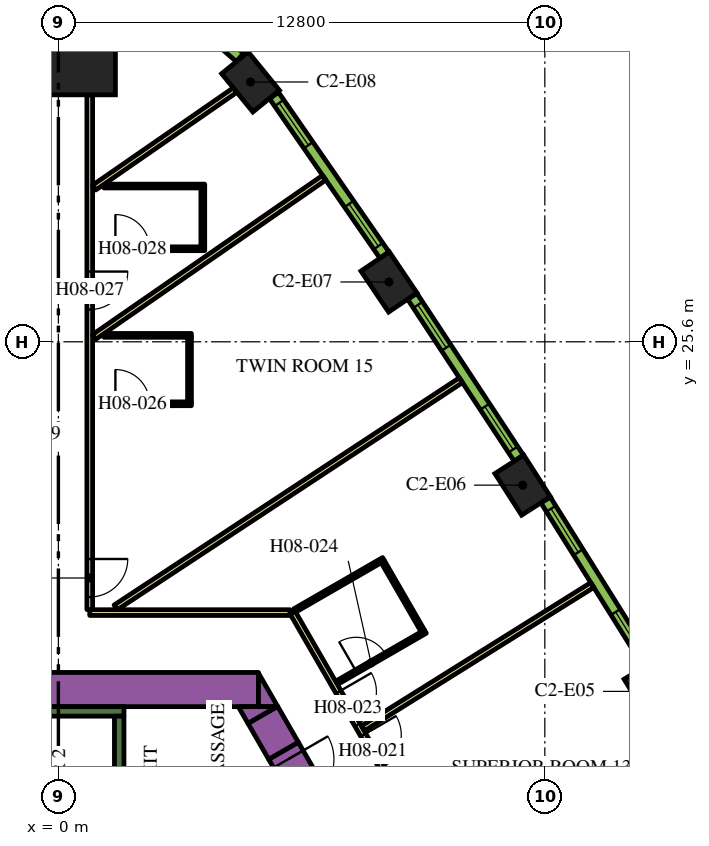
"""IFC4 building model, lengths in metres.
Left out: names, types, materials, properties, quantities, classifications, styles, units other than length and angle.
Written with IfcOpenShell. Run it as: python <this file> out.ifc"""

import sys

from ifc_helpers import new_model, si_unit, direction, frame, frame_2d, origin, origin_2d, place, context, subcontext, project, spatial, polyline, rectangle, outline, extrude, element, fill, save


model = new_model("IFC4")
c1 = context("Model", 3, precision=1e-05, world=origin(), true_north=direction((0.0, 1.0)))
c2 = subcontext(c1, "Body", "Model", "MODEL_VIEW")
j1 = project(units=[si_unit("LENGTHUNIT", "METRE"), si_unit("PLANEANGLEUNIT", "RADIAN")], contexts=[c1])
p1 = place(None, origin())
s1 = spatial("IfcSite", under=j1, at=p1, CompositionType="ELEMENT")
p2 = place(p1, origin())
s2 = spatial("IfcBuilding", under=s1, at=p2, CompositionType="ELEMENT")
p3 = place(p2, frame((0.0, 0.0, 114.9)))
s3 = spatial("IfcBuildingStorey", under=s2, at=p3, CompositionType="ELEMENT", Elevation=114.9)
p4 = place(p3, frame((0.0, 33.598, 0.0), z_axis=(0.0, 0.0, 1.0), x_axis=(0.0, 1.0, 0.0)))
e1 = element("IfcColumn", 1, at=p4, inside=s3, PredefinedType="COLUMN", context=c2, shape_type="SweptSolid", body=[
    extrude(rectangle(XDim=3.0, YDim=3.0, at=origin_2d()), origin(), (0.0, 0.0, 1.0), 3.9),
])
for number, where, z_axis, x_axis in (
    (2, (15.609, 16.402, 0.0), (0.0, 0.0, 1.0), (-0.52, 0.854, 0.0)),
    (3, (12.217, 21.828, 0.0), (0.0, 0.0, 1.0), (-0.54, 0.842, 0.0)),
    (4, (8.699, 27.174, 0.0), (0.0, 0.0, 1.0), (-0.559, 0.829, 0.0)),
    (5, (5.056, 32.437, 0.0), (0.0, 0.0, 1.0), (-0.632, 0.775, 0.0)),
):
    element("IfcColumn", number, at=place(p3, frame(where, z_axis=z_axis, x_axis=x_axis)), inside=s3, PredefinedType="COLUMN", context=c2, shape_type="SweptSolid", body=[
        extrude(rectangle(XDim=1.3, YDim=0.9, at=origin_2d()), origin(), (0.0, 0.0, 1.0), 3.9),
    ])
p5 = place(p3, frame((-4.224, 16.45, 0.0), z_axis=(0.0, 0.0, 1.0), x_axis=(1.0, 0.0, 0.0)))
e6 = element("IfcWall", 6, at=p5, inside=s3, PredefinedType="SOLIDWALL", context=c2, shape_type="SweptSolid", body=[
    extrude(rectangle(XDim=9.488, YDim=0.9, at=frame_2d((4.744, 0.0))), origin(), (0.0, 0.0, 1.0), 3.9),
])
p6 = place(p3, origin())
e7 = element("IfcWall", 7, at=p6, inside=s3, PredefinedType="SOLIDWALL", context=c2, shape_type="SweptSolid", body=[
    extrude(outline(polyline([(5.265, 16.0), (5.265, 16.88), (5.773, 16.0), (5.265, 16.0)])), origin(), (0.0, 0.0, 1.0), 3.9),
])
p7 = place(p3, frame((5.926, 14.836, 0.0), z_axis=(0.0, 0.0, 1.0), x_axis=(-0.500076735116, 0.865981096212, 0.0)))
e8 = element("IfcWall", 8, at=p7, inside=s3, PredefinedType="SOLIDWALL", context=c2, shape_type="SweptSolid", body=[
    extrude(rectangle(XDim=1.094, YDim=0.9, at=frame_2d((0.547, 0.0))), origin(), (0.0, 0.0, 1.0), 3.9),
])
e9 = element("IfcWall", 9, at=p6, inside=s3, PredefinedType="SOLIDWALL", context=c2, shape_type="SweptSolid", body=[
    extrude(outline(polyline([(4.734, 16.0), (5.75, 16.0), (4.988, 15.56), (4.734, 16.0)])), origin(), (0.0, 0.0, 1.0), 3.9),
])
p8 = place(p3, frame((-1.725, 15.875, 0.0), z_axis=(0.0, 0.0, 1.0), x_axis=(1.0, 0.0, 0.0)))
e10 = element("IfcWall", 10, at=p8, inside=s3, PredefinedType="SOLIDWALL", context=c2, shape_type="SweptSolid", body=[
    extrude(rectangle(XDim=3.45, YDim=0.25, at=frame_2d((1.725, 0.0))), origin(), (0.0, 0.0, 1.0), 3.9),
])
p9 = place(p3, frame((1.6, 8.95, 0.0), z_axis=(0.0, 0.0, 1.0), x_axis=(0.0, 1.0, 0.0)))
e11 = element("IfcWall", 11, at=p9, inside=s3, PredefinedType="SOLIDWALL", context=c2, shape_type="SweptSolid", body=[
    extrude(rectangle(XDim=6.8, YDim=0.25, at=frame_2d((3.4, 0.0))), origin(), (0.0, 0.0, 1.0), 3.9),
])
p10 = place(p3, frame((5.926, 14.836, 0.0), z_axis=(0.0, 0.0, 1.0), x_axis=(0.500062241894, -0.865989465428, 0.0)))
e12 = element("IfcWall", 12, at=p10, inside=s3, PredefinedType="SOLIDWALL", context=c2, shape_type="SweptSolid", body=[
    extrude(rectangle(XDim=1.7, YDim=0.9, at=frame_2d((0.85, 0.0))), origin(), (0.0, 0.0, 1.0), 3.9),
])
p11 = place(p10, frame((0.25, 0.0, 0.0)))
e13 = element("IfcOpeningElement", 13, at=p11, cuts=e12, PredefinedType="OPENING", context=c2, shape_type="SweptSolid", body=[
    extrude(rectangle(XDim=1.2, YDim=2.1, at=frame_2d((0.6, 1.05))), frame((0.0, 0.46, 0.0), z_axis=(0.0, -1.0, 0.0), x_axis=(1.0, 0.0, 0.0)), (0.0, 0.0, 1.0), 0.92),
])
p12 = place(p3, frame((6.163, 18.475, 0.0), z_axis=(0.0, 0.0, 1.0), x_axis=(0.500001317485, -0.866024643133, 0.0)))
e14 = element("IfcWall", 14, at=p12, inside=s3, PredefinedType="PARTITIONING", context=c2, shape_type="SweptSolid", body=[
    extrude(rectangle(XDim=25.767, YDim=0.15, at=frame_2d((12.883, 0.0))), origin(), (0.0, 0.0, 1.0), 2.75),
])
p13 = place(p12, frame((24.241, 0.0, 0.0)))
e15 = element("IfcOpeningElement", 15, at=p13, cuts=e14, PredefinedType="OPENING", context=c2, shape_type="SweptSolid", body=[
    extrude(rectangle(XDim=1.0, YDim=2.1, at=frame_2d((0.5, 1.05))), frame((0.0, 0.085, 0.0), z_axis=(0.0, -1.0, 0.0), x_axis=(1.0, 0.0, 0.0)), (0.0, 0.0, 1.0), 0.17),
])
p14 = place(p12, frame((13.144, 0.0, 0.0)))
e16 = element("IfcOpeningElement", 16, at=p14, cuts=e14, PredefinedType="OPENING", context=c2, shape_type="SweptSolid", body=[
    extrude(rectangle(XDim=1.0, YDim=2.1, at=frame_2d((0.5, 1.05))), frame((0.0, 0.085, 0.0), z_axis=(0.0, -1.0, 0.0), x_axis=(1.0, 0.0, 0.0)), (0.0, 0.0, 1.0), 0.17),
])
p15 = place(p12, frame((10.874, 0.0, 0.0)))
e17 = element("IfcOpeningElement", 17, at=p15, cuts=e14, PredefinedType="OPENING", context=c2, shape_type="SweptSolid", body=[
    extrude(rectangle(XDim=0.9, YDim=2.1, at=frame_2d((0.45, 1.05))), frame((0.0, 0.085, 0.0), z_axis=(0.0, -1.0, 0.0), x_axis=(1.0, 0.0, 0.0)), (0.0, 0.0, 1.0), 0.17),
])
p16 = place(p12, frame((3.718, 0.0, 0.0)))
e18 = element("IfcOpeningElement", 18, at=p16, cuts=e14, PredefinedType="OPENING", context=c2, shape_type="SweptSolid", body=[
    extrude(rectangle(XDim=1.0, YDim=2.1, at=frame_2d((0.5, 1.05))), frame((0.0, 0.085, 0.0), z_axis=(0.0, -1.0, 0.0), x_axis=(1.0, 0.0, 0.0)), (0.0, 0.0, 1.0), 0.17),
])
p17 = place(p12, frame((2.411, 0.0, 0.0)))
e19 = element("IfcOpeningElement", 19, at=p17, cuts=e14, PredefinedType="OPENING", context=c2, shape_type="SweptSolid", body=[
    extrude(rectangle(XDim=1.0, YDim=2.1, at=frame_2d((0.5, 1.05))), frame((0.0, 0.085, 0.0), z_axis=(0.0, -1.0, 0.0), x_axis=(1.0, 0.0, 0.0)), (0.0, 0.0, 1.0), 0.17),
])
p18 = place(p3, frame((0.825, 18.475, 0.0), z_axis=(0.0, 0.0, 1.0), x_axis=(1.0, 0.0, 0.0)))
e20 = element("IfcWall", 20, at=p18, inside=s3, PredefinedType="PARTITIONING", context=c2, shape_type="SweptSolid", body=[
    extrude(rectangle(XDim=5.268, YDim=0.15, at=frame_2d((2.634, 0.0))), origin(), (0.0, 0.0, 1.0), 2.75),
])
p19 = place(p3, frame((0.825, 32.098, 0.0), z_axis=(0.0, 0.0, 1.0), x_axis=(0.0, -1.0, 0.0)))
e21 = element("IfcWall", 21, at=p19, inside=s3, PredefinedType="PARTITIONING", context=c2, shape_type="SweptSolid", body=[
    extrude(rectangle(XDim=13.543, YDim=0.15, at=frame_2d((6.772, 0.0))), origin(), (0.0, 0.0, 1.0), 2.75),
])
p20 = place(p19, frame((12.213, 0.0, 0.0)))
e22 = element("IfcOpeningElement", 22, at=p20, cuts=e21, PredefinedType="OPENING", context=c2, shape_type="SweptSolid", body=[
    extrude(rectangle(XDim=1.0, YDim=2.1, at=frame_2d((0.5, 1.05))), frame((0.0, 0.085, 0.0), z_axis=(0.0, -1.0, 0.0), x_axis=(1.0, 0.0, 0.0)), (0.0, 0.0, 1.0), 0.17),
])
p21 = place(p19, frame((4.65, 0.0, 0.0)))
e23 = element("IfcOpeningElement", 23, at=p21, cuts=e21, PredefinedType="OPENING", context=c2, shape_type="SweptSolid", body=[
    extrude(rectangle(XDim=1.0, YDim=2.1, at=frame_2d((0.5, 1.05))), frame((0.0, 0.085, 0.0), z_axis=(0.0, -1.0, 0.0), x_axis=(1.0, 0.0, 0.0)), (0.0, 0.0, 1.0), 0.17),
])
p22 = place(p3, frame((6.994, 29.917, 0.0), z_axis=(0.0, 0.0, 1.0), x_axis=(-0.822255462494, -0.569118576747, 0.0)))
e24 = element("IfcWall", 24, at=p22, inside=s3, PredefinedType="PARTITIONING", context=c2, shape_type="SweptSolid", body=[
    extrude(rectangle(XDim=7.362, YDim=0.15, at=frame_2d((3.681, 0.0))), origin(), (0.0, 0.0, 1.0), 2.75),
])
p23 = place(p3, frame((10.592, 24.589, 0.0), z_axis=(0.0, 0.0, 1.0), x_axis=(-0.835337323748, -0.549737715236, 0.0)))
e25 = element("IfcWall", 25, at=p23, inside=s3, PredefinedType="PARTITIONING", context=c2, shape_type="SweptSolid", body=[
    extrude(rectangle(XDim=10.875, YDim=0.15, at=frame_2d((5.438, 0.0))), origin(), (0.0, 0.0, 1.0), 2.75),
])
p24 = place(p3, frame((4.649, 32.223, 0.0), z_axis=(0.0, 0.0, 1.0), x_axis=(-0.822262349475, -0.569108626394, 0.0)))
e26 = element("IfcWall", 26, at=p24, inside=s3, PredefinedType="PARTITIONING", context=c2, shape_type="SweptSolid", body=[
    extrude(rectangle(XDim=4.51, YDim=0.15, at=frame_2d((2.255, 0.0))), origin(), (0.0, 0.0, 1.0), 2.75),
])
p25 = place(p3, frame((14.049, 19.2, 0.0), z_axis=(0.0, 0.0, 1.0), x_axis=(-0.847955867271, -0.530066832731, 0.0)))
e27 = element("IfcWall", 27, at=p25, inside=s3, PredefinedType="PARTITIONING", context=c2, shape_type="SweptSolid", body=[
    extrude(rectangle(XDim=7.111, YDim=0.15, at=frame_2d((3.556, 0.0))), origin(), (0.0, 0.0, 1.0), 2.75),
])
p26 = place(p3, frame((7.318, 16.625, 0.0), z_axis=(0.0, 0.0, 1.0), x_axis=(0.866019956843, 0.50000943426, 0.0)))
e28 = element("IfcWall", 28, at=p26, inside=s3, PredefinedType="PARTITIONING", context=c2, shape_type="SweptSolid", body=[
    extrude(rectangle(XDim=2.7, YDim=0.1, at=frame_2d((1.35, 0.0))), origin(), (0.0, 0.0, 1.0), 2.75),
])
p27 = place(p26, frame((0.6, 0.0, 0.0)))
e29 = element("IfcOpeningElement", 29, at=p27, cuts=e28, PredefinedType="OPENING", context=c2, shape_type="SweptSolid", body=[
    extrude(rectangle(XDim=0.9, YDim=2.1, at=frame_2d((0.45, 1.05))), frame((0.0, 0.06, 0.0), z_axis=(0.0, -1.0, 0.0), x_axis=(1.0, 0.0, 0.0)), (0.0, 0.0, 1.0), 0.12),
])
p28 = place(p3, frame((9.588, 17.993, 0.0), z_axis=(0.0, 0.0, 1.0), x_axis=(-0.500027713859, 0.866009402589, 0.0)))
e30 = element("IfcWall", 30, at=p28, inside=s3, PredefinedType="PARTITIONING", context=c2, shape_type="SweptSolid", body=[
    extrude(rectangle(XDim=2.1, YDim=0.1, at=frame_2d((1.05, 0.0))), origin(), (0.0, 0.0, 1.0), 2.75),
])
p29 = place(p3, frame((6.218, 18.53, 0.0), z_axis=(0.0, 0.0, 1.0), x_axis=(0.86599734893, 0.500048589285, 0.0)))
e31 = element("IfcWall", 31, at=p29, inside=s3, PredefinedType="PARTITIONING", context=c2, shape_type="SweptSolid", body=[
    extrude(rectangle(XDim=2.7, YDim=0.1, at=frame_2d((1.35, 0.0))), origin(), (0.0, 0.0, 1.0), 2.75),
])
p30 = place(p3, frame((0.9, 23.969, 0.0), z_axis=(0.0, 0.0, 1.0), x_axis=(1.0, 0.0, 0.0)))
e32 = element("IfcWall", 32, at=p30, inside=s3, PredefinedType="PARTITIONING", context=c2, shape_type="SweptSolid", body=[
    extrude(rectangle(XDim=2.6, YDim=0.1, at=frame_2d((1.3, 0.0))), origin(), (0.0, 0.0, 1.0), 2.75),
])
p31 = place(p30, frame((0.6, 0.0, 0.0)))
e33 = element("IfcOpeningElement", 33, at=p31, cuts=e32, PredefinedType="OPENING", context=c2, shape_type="SweptSolid", body=[
    extrude(rectangle(XDim=0.9, YDim=2.1, at=frame_2d((0.45, 1.05))), frame((0.0, 0.06, 0.0), z_axis=(0.0, -1.0, 0.0), x_axis=(1.0, 0.0, 0.0)), (0.0, 0.0, 1.0), 0.12),
])
p32 = place(p3, frame((3.45, 24.019, 0.0), z_axis=(0.0, 0.0, 1.0), x_axis=(0.0, 1.0, 0.0)))
e34 = element("IfcWall", 34, at=p32, inside=s3, PredefinedType="PARTITIONING", context=c2, shape_type="SweptSolid", body=[
    extrude(rectangle(XDim=1.7, YDim=0.1, at=frame_2d((0.85, 0.0))), origin(), (0.0, 0.0, 1.0), 2.75),
])
p33 = place(p3, frame((1.2, 25.769, 0.0), z_axis=(0.0, 0.0, 1.0), x_axis=(1.0, 0.0, 0.0)))
e35 = element("IfcWall", 35, at=p33, inside=s3, PredefinedType="PARTITIONING", context=c2, shape_type="SweptSolid", body=[
    extrude(rectangle(XDim=2.3, YDim=0.1, at=frame_2d((1.15, 0.0))), origin(), (0.0, 0.0, 1.0), 2.75),
])
p34 = place(p3, frame((0.9, 28.048, 0.0), z_axis=(0.0, 0.0, 1.0), x_axis=(1.0, 0.0, 0.0)))
e36 = element("IfcWall", 36, at=p34, inside=s3, PredefinedType="PARTITIONING", context=c2, shape_type="SweptSolid", body=[
    extrude(rectangle(XDim=2.95, YDim=0.1, at=frame_2d((1.475, 0.0))), origin(), (0.0, 0.0, 1.0), 2.75),
])
p35 = place(p34, frame((0.6, 0.0, 0.0)))
e37 = element("IfcOpeningElement", 37, at=p35, cuts=e36, PredefinedType="OPENING", context=c2, shape_type="SweptSolid", body=[
    extrude(rectangle(XDim=0.9, YDim=2.1, at=frame_2d((0.45, 1.05))), frame((0.0, 0.06, 0.0), z_axis=(0.0, -1.0, 0.0), x_axis=(1.0, 0.0, 0.0)), (0.0, 0.0, 1.0), 0.12),
])
p36 = place(p3, frame((3.8, 28.098, 0.0), z_axis=(0.0, 0.0, 1.0), x_axis=(0.0, 1.0, 0.0)))
e38 = element("IfcWall", 38, at=p36, inside=s3, PredefinedType="PARTITIONING", context=c2, shape_type="SweptSolid", body=[
    extrude(rectangle(XDim=1.55, YDim=0.1, at=frame_2d((0.775, 0.0))), origin(), (0.0, 0.0, 1.0), 2.75),
])
p37 = place(p3, frame((1.2, 29.698, 0.0), z_axis=(0.0, 0.0, 1.0), x_axis=(1.0, 0.0, 0.0)))
e39 = element("IfcWall", 39, at=p37, inside=s3, PredefinedType="PARTITIONING", context=c2, shape_type="SweptSolid", body=[
    extrude(rectangle(XDim=2.65, YDim=0.1, at=frame_2d((1.325, 0.0))), origin(), (0.0, 0.0, 1.0), 2.75),
])
p38 = place(p3, frame((15.524, 17.114, 0.0), z_axis=(0.0, 0.0, 1.0), x_axis=(-0.530072082134, 0.847952585787, 0.0)))
e40 = element("IfcWall", 40, at=p38, inside=s3, PredefinedType="SOLIDWALL", context=c2, shape_type="SweptSolid", body=[
    extrude(rectangle(XDim=5.1, YDim=0.29, at=frame_2d((2.55, 0.0))), origin(), (0.0, 0.0, 1.0), 3.65),
])
p39 = place(p38, frame((0.273, 0.0, 0.9)))
e41 = element("IfcOpeningElement", 41, at=p39, cuts=e40, PredefinedType="OPENING", context=c2, shape_type="SweptSolid", body=[
    extrude(rectangle(XDim=1.35, YDim=2.15, at=frame_2d((0.675, 1.075))), frame((0.0, 0.155, 0.0), z_axis=(0.0, -1.0, 0.0), x_axis=(1.0, 0.0, 0.0)), (0.0, 0.0, 1.0), 0.31),
])
p40 = place(p38, frame((3.478, 0.0, 0.9)))
e42 = element("IfcOpeningElement", 42, at=p40, cuts=e40, PredefinedType="OPENING", context=c2, shape_type="SweptSolid", body=[
    extrude(rectangle(XDim=1.35, YDim=2.15, at=frame_2d((0.675, 1.075))), frame((0.0, 0.155, 0.0), z_axis=(0.0, -1.0, 0.0), x_axis=(1.0, 0.0, 0.0)), (0.0, 0.0, 1.0), 0.31),
])
p41 = place(p3, frame((12.115, 22.539, 0.0), z_axis=(0.0, 0.0, 1.0), x_axis=(-0.549741341923, 0.835334937005, 0.0)))
e43 = element("IfcWall", 43, at=p41, inside=s3, PredefinedType="SOLIDWALL", context=c2, shape_type="SweptSolid", body=[
    extrude(rectangle(XDim=5.1, YDim=0.29, at=frame_2d((2.55, 0.0))), origin(), (0.0, 0.0, 1.0), 3.65),
])
p42 = place(p41, frame((0.273, 0.0, 0.9)))
e44 = element("IfcOpeningElement", 44, at=p42, cuts=e43, PredefinedType="OPENING", context=c2, shape_type="SweptSolid", body=[
    extrude(rectangle(XDim=1.35, YDim=2.15, at=frame_2d((0.675, 1.075))), frame((0.0, 0.155, 0.0), z_axis=(0.0, -1.0, 0.0), x_axis=(1.0, 0.0, 0.0)), (0.0, 0.0, 1.0), 0.31),
])
p43 = place(p41, frame((3.478, 0.0, 0.9)))
e45 = element("IfcOpeningElement", 45, at=p43, cuts=e43, PredefinedType="OPENING", context=c2, shape_type="SweptSolid", body=[
    extrude(rectangle(XDim=1.35, YDim=2.15, at=frame_2d((0.675, 1.075))), frame((0.0, 0.155, 0.0), z_axis=(0.0, -1.0, 0.0), x_axis=(1.0, 0.0, 0.0)), (0.0, 0.0, 1.0), 0.31),
])
p44 = place(p3, frame((8.58, 27.882, 0.0), z_axis=(0.0, 0.0, 1.0), x_axis=(-0.569113019126, 0.822259309136, 0.0)))
e46 = element("IfcWall", 46, at=p44, inside=s3, PredefinedType="SOLIDWALL", context=c2, shape_type="SweptSolid", body=[
    extrude(rectangle(XDim=5.107, YDim=0.29, at=frame_2d((2.553, 0.0))), origin(), (0.0, 0.0, 1.0), 3.65),
])
p45 = place(p44, frame((0.285, 0.0, 0.9)))
e47 = element("IfcOpeningElement", 47, at=p45, cuts=e46, PredefinedType="OPENING", context=c2, shape_type="SweptSolid", body=[
    extrude(rectangle(XDim=1.35, YDim=2.15, at=frame_2d((0.675, 1.075))), frame((0.0, 0.155, 0.0), z_axis=(0.0, -1.0, 0.0), x_axis=(1.0, 0.0, 0.0)), (0.0, 0.0, 1.0), 0.31),
])
p46 = place(p44, frame((3.516, 0.0, 0.9)))
e48 = element("IfcOpeningElement", 48, at=p46, cuts=e46, PredefinedType="OPENING", context=c2, shape_type="SweptSolid", body=[
    extrude(rectangle(XDim=1.35, YDim=2.15, at=frame_2d((0.675, 1.075))), frame((0.0, 0.155, 0.0), z_axis=(0.0, -1.0, 0.0), x_axis=(1.0, 0.0, 0.0)), (0.0, 0.0, 1.0), 0.31),
])
p47 = place(p3, frame((4.778, 33.082, 0.0), z_axis=(0.0, 0.0, 1.0), x_axis=(-0.754882764627, 0.655859749999, 0.0)))
e49 = element("IfcWall", 49, at=p47, inside=s3, PredefinedType="SOLIDWALL", context=c2, shape_type="SweptSolid", body=[
    extrude(rectangle(XDim=1.82, YDim=0.29, at=frame_2d((0.91, 0.0))), origin(), (0.0, 0.0, 1.0), 3.65),
])
p48 = place(p47, frame((0.46, 0.0, 0.9)))
e50 = element("IfcOpeningElement", 50, at=p48, cuts=e49, PredefinedType="OPENING", context=c2, shape_type="SweptSolid", body=[
    extrude(rectangle(XDim=0.9, YDim=2.15, at=frame_2d((0.45, 1.075))), frame((0.0, 0.155, 0.0), z_axis=(0.0, -1.0, 0.0), x_axis=(1.0, 0.0, 0.0)), (0.0, 0.0, 1.0), 0.31),
])
p49 = place(p11, origin())
e51 = element("IfcDoor", 51, at=p49, inside=s3, OperationType="SINGLE_SWING_LEFT", PredefinedType="DOOR", context=c2, shape_type="SweptSolid", body=[
    extrude(rectangle(XDim=1.2, YDim=2.1, at=frame_2d((0.6, 1.05))), frame((0.0, 0.025, 0.0), z_axis=(0.0, -1.0, 0.0), x_axis=(1.0, 0.0, 0.0)), (0.0, 0.0, 1.0), 0.05),
])
fill(e13, e51)
p50 = place(p16, origin())
e52 = element("IfcDoor", 52, at=p50, inside=s3, OperationType="SINGLE_SWING_LEFT", PredefinedType="DOOR", context=c2, shape_type="SweptSolid", body=[
    extrude(rectangle(XDim=1.0, YDim=2.1, at=frame_2d((0.5, 1.05))), frame((0.0, 0.025, 0.0), z_axis=(0.0, -1.0, 0.0), x_axis=(1.0, 0.0, 0.0)), (0.0, 0.0, 1.0), 0.05),
])
fill(e18, e52)
p51 = place(p17, origin())
e53 = element("IfcDoor", 53, at=p51, inside=s3, OperationType="SINGLE_SWING_RIGHT", PredefinedType="DOOR", context=c2, shape_type="SweptSolid", body=[
    extrude(rectangle(XDim=1.0, YDim=2.1, at=frame_2d((0.5, 1.05))), frame((0.0, 0.025, 0.0), z_axis=(0.0, -1.0, 0.0), x_axis=(1.0, 0.0, 0.0)), (0.0, 0.0, 1.0), 0.05),
])
fill(e19, e53)
p52 = place(p27, origin())
e54 = element("IfcDoor", 54, at=p52, inside=s3, OperationType="SINGLE_SWING_LEFT", PredefinedType="DOOR", context=c2, shape_type="SweptSolid", body=[
    extrude(rectangle(XDim=0.9, YDim=2.1, at=frame_2d((0.45, 1.05))), frame((0.0, 0.025, 0.0), z_axis=(0.0, -1.0, 0.0), x_axis=(1.0, 0.0, 0.0)), (0.0, 0.0, 1.0), 0.05),
])
fill(e29, e54)
p53 = place(p20, origin())
e55 = element("IfcDoor", 55, at=p53, inside=s3, OperationType="SINGLE_SWING_RIGHT", PredefinedType="DOOR", context=c2, shape_type="SweptSolid", body=[
    extrude(rectangle(XDim=1.0, YDim=2.1, at=frame_2d((0.5, 1.05))), frame((0.0, 0.025, 0.0), z_axis=(0.0, -1.0, 0.0), x_axis=(1.0, 0.0, 0.0)), (0.0, 0.0, 1.0), 0.05),
])
fill(e22, e55)
p54 = place(p31, origin())
e56 = element("IfcDoor", 56, at=p54, inside=s3, OperationType="SINGLE_SWING_RIGHT", PredefinedType="DOOR", context=c2, shape_type="SweptSolid", body=[
    extrude(rectangle(XDim=0.9, YDim=2.1, at=frame_2d((0.45, 1.05))), frame((0.0, 0.025, 0.0), z_axis=(0.0, -1.0, 0.0), x_axis=(1.0, 0.0, 0.0)), (0.0, 0.0, 1.0), 0.05),
])
fill(e33, e56)
p55 = place(p21, origin())
e57 = element("IfcDoor", 57, at=p55, inside=s3, OperationType="SINGLE_SWING_RIGHT", PredefinedType="DOOR", context=c2, shape_type="SweptSolid", body=[
    extrude(rectangle(XDim=1.0, YDim=2.1, at=frame_2d((0.5, 1.05))), frame((0.0, 0.025, 0.0), z_axis=(0.0, -1.0, 0.0), x_axis=(1.0, 0.0, 0.0)), (0.0, 0.0, 1.0), 0.05),
])
fill(e23, e57)
p56 = place(p35, origin())
e58 = element("IfcDoor", 58, at=p56, inside=s3, OperationType="SINGLE_SWING_LEFT", PredefinedType="DOOR", context=c2, shape_type="SweptSolid", body=[
    extrude(rectangle(XDim=0.9, YDim=2.1, at=frame_2d((0.45, 1.05))), frame((0.0, 0.025, 0.0), z_axis=(0.0, -1.0, 0.0), x_axis=(1.0, 0.0, 0.0)), (0.0, 0.0, 1.0), 0.05),
])
fill(e37, e58)
p57 = place(p39, origin())
e59 = element("IfcWindow", 59, at=p57, inside=s3, PartitioningType="DOUBLE_PANEL_VERTICAL", PredefinedType="WINDOW", context=c2, shape_type="SweptSolid", body=[
    extrude(rectangle(XDim=1.35, YDim=2.15, at=frame_2d((0.675, 1.075))), frame((0.0, 0.015, 0.0), z_axis=(0.0, -1.0, 0.0), x_axis=(1.0, 0.0, 0.0)), (0.0, 0.0, 1.0), 0.06),
])
fill(e41, e59)
p58 = place(p40, origin())
e60 = element("IfcWindow", 60, at=p58, inside=s3, PartitioningType="DOUBLE_PANEL_VERTICAL", PredefinedType="WINDOW", context=c2, shape_type="SweptSolid", body=[
    extrude(rectangle(XDim=1.35, YDim=2.15, at=frame_2d((0.675, 1.075))), frame((0.0, 0.015, 0.0), z_axis=(0.0, -1.0, 0.0), x_axis=(1.0, 0.0, 0.0)), (0.0, 0.0, 1.0), 0.06),
])
fill(e42, e60)
p59 = place(p42, origin())
e61 = element("IfcWindow", 61, at=p59, inside=s3, PartitioningType="DOUBLE_PANEL_VERTICAL", PredefinedType="WINDOW", context=c2, shape_type="SweptSolid", body=[
    extrude(rectangle(XDim=1.35, YDim=2.15, at=frame_2d((0.675, 1.075))), frame((0.0, 0.015, 0.0), z_axis=(0.0, -1.0, 0.0), x_axis=(1.0, 0.0, 0.0)), (0.0, 0.0, 1.0), 0.06),
])
fill(e44, e61)
p60 = place(p43, origin())
e62 = element("IfcWindow", 62, at=p60, inside=s3, PartitioningType="DOUBLE_PANEL_VERTICAL", PredefinedType="WINDOW", context=c2, shape_type="SweptSolid", body=[
    extrude(rectangle(XDim=1.35, YDim=2.15, at=frame_2d((0.675, 1.075))), frame((0.0, 0.015, 0.0), z_axis=(0.0, -1.0, 0.0), x_axis=(1.0, 0.0, 0.0)), (0.0, 0.0, 1.0), 0.06),
])
fill(e45, e62)
p61 = place(p45, origin())
e63 = element("IfcWindow", 63, at=p61, inside=s3, PartitioningType="DOUBLE_PANEL_VERTICAL", PredefinedType="WINDOW", context=c2, shape_type="SweptSolid", body=[
    extrude(rectangle(XDim=1.35, YDim=2.15, at=frame_2d((0.675, 1.075))), frame((0.0, 0.015, 0.0), z_axis=(0.0, -1.0, 0.0), x_axis=(1.0, 0.0, 0.0)), (0.0, 0.0, 1.0), 0.06),
])
fill(e47, e63)
p62 = place(p46, origin())
e64 = element("IfcWindow", 64, at=p62, inside=s3, PartitioningType="DOUBLE_PANEL_VERTICAL", PredefinedType="WINDOW", context=c2, shape_type="SweptSolid", body=[
    extrude(rectangle(XDim=1.35, YDim=2.15, at=frame_2d((0.675, 1.075))), frame((0.0, 0.015, 0.0), z_axis=(0.0, -1.0, 0.0), x_axis=(1.0, 0.0, 0.0)), (0.0, 0.0, 1.0), 0.06),
])
fill(e48, e64)
save(model, sys.argv[1])
